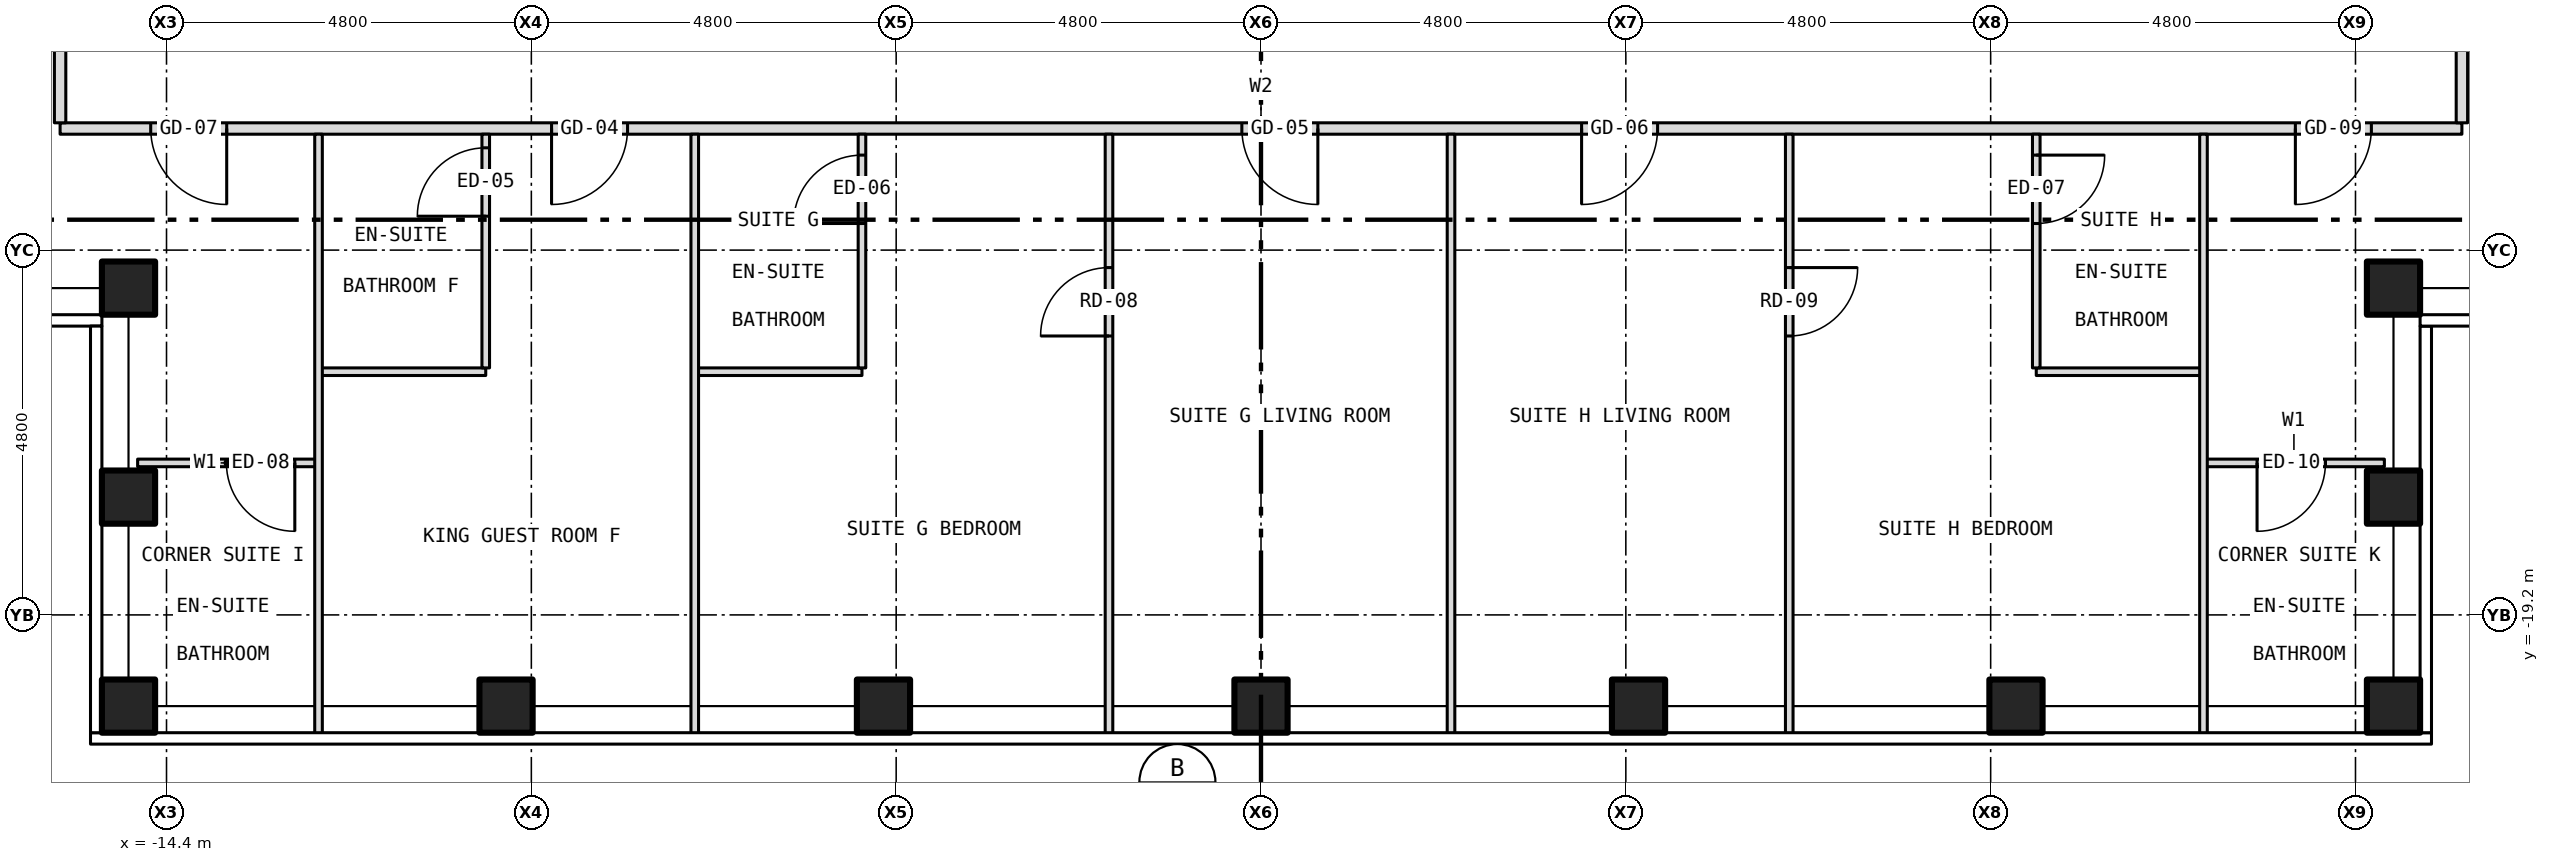
"""IFC4 building model, lengths in metres.
Left out: names, types, materials, properties, quantities, classifications, styles, units other than length and angle.
Written with IfcOpenShell. Run it as: python <this file> out.ifc"""

import sys

from ifc_helpers import new_model, si_unit, direction, frame, frame_2d, origin, origin_2d, place, context, subcontext, project, spatial, rectangle, hollow_rectangle, extrude, element, fill, save


model = new_model("IFC4")
c1 = context("Model", 3, precision=1e-05, world=origin(), true_north=direction((0.0, 1.0)))
c2 = subcontext(c1, "Body", "Model", "MODEL_VIEW")
j1 = project(units=[si_unit("LENGTHUNIT", "METRE"), si_unit("PLANEANGLEUNIT", "RADIAN")], contexts=[c1])
p1 = place(None, origin())
s1 = spatial("IfcSite", under=j1, at=p1, CompositionType="ELEMENT")
p2 = place(p1, origin())
s2 = spatial("IfcBuilding", under=s1, at=p2, CompositionType="ELEMENT")
p3 = place(p2, frame((0.0, 0.0, 212.0)))
s3 = spatial("IfcBuildingStorey", under=s2, at=p3, CompositionType="ELEMENT", Elevation=212.0)
for number, where, z_axis, x_axis in (
    (1, (-14.9, -20.4, -0.15), (0.0, 0.0, 1.0), (1.0, 0.0, 0.0)),
    (2, (-9.933, -20.4, -0.15), (0.0, 0.0, 1.0), (1.0, 0.0, 0.0)),
    (3, (-4.967, -20.4, -0.15), (0.0, 0.0, 1.0), (1.0, 0.0, 0.0)),
    (4, (0.0, -20.4, -0.15), (0.0, 0.0, 1.0), (1.0, 0.0, 0.0)),
    (5, (4.967, -20.4, -0.15), (0.0, 0.0, 1.0), (1.0, 0.0, 0.0)),
    (6, (9.933, -20.4, -0.15), (0.0, 0.0, 1.0), (1.0, 0.0, 0.0)),
    (7, (14.9, -20.4, -0.15), (0.0, 0.0, 1.0), (1.0, 0.0, 0.0)),
    (8, (-14.9, -14.9, -0.15), (0.0, 0.0, 1.0), (1.0, 0.0, 0.0)),
    (9, (-14.9, -17.65, -0.15), (0.0, 0.0, 1.0), (1.0, 0.0, 0.0)),
    (10, (14.9, -14.9, -0.15), (0.0, 0.0, 1.0), (1.0, 0.0, 0.0)),
    (11, (14.9, -17.65, -0.15), (0.0, 0.0, 1.0), (1.0, 0.0, 0.0)),
):
    element("IfcColumn", number, at=place(p3, frame(where, z_axis=z_axis, x_axis=x_axis)), inside=s3, PredefinedType="COLUMN", context=c2, shape_type="SweptSolid", body=[
        extrude(hollow_rectangle(XDim=0.7, YDim=0.7, WallThickness=0.04, at=origin_2d()), origin(), (0.0, 0.0, 1.0), 3.5),
    ])
p4 = place(p3, frame((-14.78, -17.2, 0.0), z_axis=(0.0, 0.0, 1.0), x_axis=(1.0, 0.0, 0.0)))
e12 = element("IfcWall", 12, at=p4, inside=s3, PredefinedType="PARTITIONING", context=c2, shape_type="SweptSolid", body=[
    extrude(rectangle(XDim=2.38, YDim=0.1, at=frame_2d((1.19, 0.0))), origin(), (0.0, 0.0, 1.0), 3.35),
])
p5 = place(p4, frame((1.168, 0.0, 0.0)))
e13 = element("IfcOpeningElement", 13, at=p5, cuts=e12, PredefinedType="OPENING", context=c2, shape_type="SweptSolid", body=[
    extrude(rectangle(XDim=0.9, YDim=2.1, at=frame_2d((0.45, 1.05))), frame((0.0, 0.062, 0.0), z_axis=(0.0, -1.0, 0.0), x_axis=(1.0, 0.0, 0.0)), (0.0, 0.0, 1.0), 0.124),
])
p6 = place(p3, frame((12.4, -17.2, 0.0), z_axis=(0.0, 0.0, 1.0), x_axis=(1.0, 0.0, 0.0)))
e14 = element("IfcWall", 14, at=p6, inside=s3, PredefinedType="PARTITIONING", context=c2, shape_type="SweptSolid", body=[
    extrude(rectangle(XDim=2.38, YDim=0.1, at=frame_2d((1.19, 0.0))), origin(), (0.0, 0.0, 1.0), 3.35),
])
p7 = place(p6, frame((0.705, 0.0, 0.0)))
e15 = element("IfcOpeningElement", 15, at=p7, cuts=e14, PredefinedType="OPENING", context=c2, shape_type="SweptSolid", body=[
    extrude(rectangle(XDim=0.9, YDim=2.1, at=frame_2d((0.45, 1.05))), frame((0.0, 0.062, 0.0), z_axis=(0.0, -1.0, 0.0), x_axis=(1.0, 0.0, 0.0)), (0.0, 0.0, 1.0), 0.124),
])
for number, where, z_axis, x_axis in (
    (16, (-12.4, -16.0, 0.0), (0.0, 0.0, 1.0), (1.0, 0.0, 0.0)),
    (17, (-7.45, -16.0, 0.0), (0.0, 0.0, 1.0), (1.0, 0.0, 0.0)),
    (18, (10.2, -16.0, 0.0), (0.0, 0.0, 1.0), (1.0, 0.0, 0.0)),
):
    element("IfcWall", number, at=place(p3, frame(where, z_axis=z_axis, x_axis=x_axis)), inside=s3, PredefinedType="PARTITIONING", context=c2, shape_type="SweptSolid", body=[
        extrude(rectangle(XDim=2.2, YDim=0.1, at=frame_2d((1.1, 0.0))), origin(), (0.0, 0.0, 1.0), 3.35),
    ])
p8 = place(p3, frame((-15.8, -12.8, 0.0), z_axis=(0.0, 0.0, 1.0), x_axis=(1.0, 0.0, 0.0)))
e19 = element("IfcWall", 19, at=p8, inside=s3, PredefinedType="PARTITIONING", context=c2, shape_type="SweptSolid", body=[
    extrude(rectangle(XDim=31.6, YDim=0.15, at=frame_2d((15.8, 0.0))), origin(), (0.0, 0.0, 1.0), 3.35),
])
p9 = place(p8, frame((6.466, 0.0, 0.0)))
e20 = element("IfcOpeningElement", 20, at=p9, cuts=e19, PredefinedType="OPENING", context=c2, shape_type="SweptSolid", body=[
    extrude(rectangle(XDim=1.0, YDim=2.1, at=frame_2d((0.5, 1.05))), frame((0.0, 0.087, 0.0), z_axis=(0.0, -1.0, 0.0), x_axis=(1.0, 0.0, 0.0)), (0.0, 0.0, 1.0), 0.174),
])
p10 = place(p8, frame((15.548, 0.0, 0.0)))
e21 = element("IfcOpeningElement", 21, at=p10, cuts=e19, PredefinedType="OPENING", context=c2, shape_type="SweptSolid", body=[
    extrude(rectangle(XDim=1.0, YDim=2.1, at=frame_2d((0.5, 1.05))), frame((0.0, 0.087, 0.0), z_axis=(0.0, -1.0, 0.0), x_axis=(1.0, 0.0, 0.0)), (0.0, 0.0, 1.0), 0.174),
])
p11 = place(p8, frame((20.018, 0.0, 0.0)))
e22 = element("IfcOpeningElement", 22, at=p11, cuts=e19, PredefinedType="OPENING", context=c2, shape_type="SweptSolid", body=[
    extrude(rectangle(XDim=1.0, YDim=2.1, at=frame_2d((0.5, 1.05))), frame((0.0, 0.087, 0.0), z_axis=(0.0, -1.0, 0.0), x_axis=(1.0, 0.0, 0.0)), (0.0, 0.0, 1.0), 0.174),
])
p12 = place(p8, frame((1.192, 0.0, 0.0)))
e23 = element("IfcOpeningElement", 23, at=p12, cuts=e19, PredefinedType="OPENING", context=c2, shape_type="SweptSolid", body=[
    extrude(rectangle(XDim=1.0, YDim=2.1, at=frame_2d((0.5, 1.05))), frame((0.0, 0.087, 0.0), z_axis=(0.0, -1.0, 0.0), x_axis=(1.0, 0.0, 0.0)), (0.0, 0.0, 1.0), 0.174),
])
p13 = place(p8, frame((29.409, 0.0, 0.0)))
e24 = element("IfcOpeningElement", 24, at=p13, cuts=e19, PredefinedType="OPENING", context=c2, shape_type="SweptSolid", body=[
    extrude(rectangle(XDim=1.0, YDim=2.1, at=frame_2d((0.5, 1.05))), frame((0.0, 0.087, 0.0), z_axis=(0.0, -1.0, 0.0), x_axis=(1.0, 0.0, 0.0)), (0.0, 0.0, 1.0), 0.174),
])
p14 = place(p3, frame((-15.8, -12.725, 0.0), z_axis=(0.0, 0.0, 1.0), x_axis=(0.0, 1.0, 0.0)))
e25 = element("IfcWall", 25, at=p14, inside=s3, PredefinedType="PARTITIONING", context=c2, shape_type="SweptSolid", body=[
    extrude(rectangle(XDim=1.805, YDim=0.15, at=frame_2d((0.903, 0.0))), origin(), (0.0, 0.0, 1.0), 3.35),
])
p15 = place(p3, frame((-12.4, -20.78, 0.0), z_axis=(0.0, 0.0, 1.0), x_axis=(0.0, 1.0, 0.0)))
e26 = element("IfcWall", 26, at=p15, inside=s3, PredefinedType="PARTITIONING", context=c2, shape_type="SweptSolid", body=[
    extrude(rectangle(XDim=7.905, YDim=0.1, at=frame_2d((3.953, 0.0))), origin(), (0.0, 0.0, 1.0), 3.35),
])
p16 = place(p3, frame((-10.2, -15.95, 0.0), z_axis=(0.0, 0.0, 1.0), x_axis=(0.0, 1.0, 0.0)))
e27 = element("IfcWall", 27, at=p16, inside=s3, PredefinedType="PARTITIONING", context=c2, shape_type="SweptSolid", body=[
    extrude(rectangle(XDim=3.075, YDim=0.1, at=frame_2d((1.538, 0.0))), origin(), (0.0, 0.0, 1.0), 3.35),
])
p17 = place(p16, frame((1.996, 0.0, 0.0)))
e28 = element("IfcOpeningElement", 28, at=p17, cuts=e27, PredefinedType="OPENING", context=c2, shape_type="SweptSolid", body=[
    extrude(rectangle(XDim=0.9, YDim=2.1, at=frame_2d((0.45, 1.05))), frame((0.0, 0.062, 0.0), z_axis=(0.0, -1.0, 0.0), x_axis=(1.0, 0.0, 0.0)), (0.0, 0.0, 1.0), 0.124),
])
p18 = place(p3, frame((-7.45, -20.78, 0.0), z_axis=(0.0, 0.0, 1.0), x_axis=(0.0, 1.0, 0.0)))
e29 = element("IfcWall", 29, at=p18, inside=s3, PredefinedType="PARTITIONING", context=c2, shape_type="SweptSolid", body=[
    extrude(rectangle(XDim=7.905, YDim=0.1, at=frame_2d((3.953, 0.0))), origin(), (0.0, 0.0, 1.0), 3.35),
])
p19 = place(p3, frame((-5.25, -15.95, 0.0), z_axis=(0.0, 0.0, 1.0), x_axis=(0.0, 1.0, 0.0)))
e30 = element("IfcWall", 30, at=p19, inside=s3, PredefinedType="PARTITIONING", context=c2, shape_type="SweptSolid", body=[
    extrude(rectangle(XDim=3.075, YDim=0.1, at=frame_2d((1.538, 0.0))), origin(), (0.0, 0.0, 1.0), 3.35),
])
p20 = place(p19, frame((1.9, 0.0, 0.0)))
e31 = element("IfcOpeningElement", 31, at=p20, cuts=e30, PredefinedType="OPENING", context=c2, shape_type="SweptSolid", body=[
    extrude(rectangle(XDim=0.9, YDim=2.1, at=frame_2d((0.45, 1.05))), frame((0.0, 0.062, 0.0), z_axis=(0.0, -1.0, 0.0), x_axis=(1.0, 0.0, 0.0)), (0.0, 0.0, 1.0), 0.124),
])
p21 = place(p3, frame((-2.0, -20.78, 0.0), z_axis=(0.0, 0.0, 1.0), x_axis=(0.0, 1.0, 0.0)))
e32 = element("IfcWall", 32, at=p21, inside=s3, PredefinedType="PARTITIONING", context=c2, shape_type="SweptSolid", body=[
    extrude(rectangle(XDim=7.905, YDim=0.1, at=frame_2d((3.953, 0.0))), origin(), (0.0, 0.0, 1.0), 3.35),
])
p22 = place(p21, frame((5.25, 0.0, 0.0)))
e33 = element("IfcOpeningElement", 33, at=p22, cuts=e32, PredefinedType="OPENING", context=c2, shape_type="SweptSolid", body=[
    extrude(rectangle(XDim=0.9, YDim=2.1, at=frame_2d((0.45, 1.05))), frame((0.0, 0.062, 0.0), z_axis=(0.0, -1.0, 0.0), x_axis=(1.0, 0.0, 0.0)), (0.0, 0.0, 1.0), 0.124),
])
p23 = place(p3, frame((2.5, -20.78, 0.0), z_axis=(0.0, 0.0, 1.0), x_axis=(0.0, 1.0, 0.0)))
e34 = element("IfcWall", 34, at=p23, inside=s3, PredefinedType="PARTITIONING", context=c2, shape_type="SweptSolid", body=[
    extrude(rectangle(XDim=7.905, YDim=0.1, at=frame_2d((3.953, 0.0))), origin(), (0.0, 0.0, 1.0), 3.35),
])
p24 = place(p3, frame((6.95, -20.78, 0.0), z_axis=(0.0, 0.0, 1.0), x_axis=(0.0, 1.0, 0.0)))
e35 = element("IfcWall", 35, at=p24, inside=s3, PredefinedType="PARTITIONING", context=c2, shape_type="SweptSolid", body=[
    extrude(rectangle(XDim=7.905, YDim=0.1, at=frame_2d((3.953, 0.0))), origin(), (0.0, 0.0, 1.0), 3.35),
])
p25 = place(p24, frame((5.25, 0.0, 0.0)))
e36 = element("IfcOpeningElement", 36, at=p25, cuts=e35, PredefinedType="OPENING", context=c2, shape_type="SweptSolid", body=[
    extrude(rectangle(XDim=0.9, YDim=2.1, at=frame_2d((0.45, 1.05))), frame((0.0, 0.062, 0.0), z_axis=(0.0, -1.0, 0.0), x_axis=(1.0, 0.0, 0.0)), (0.0, 0.0, 1.0), 0.124),
])
p26 = place(p3, frame((10.2, -15.95, 0.0), z_axis=(0.0, 0.0, 1.0), x_axis=(0.0, 1.0, 0.0)))
e37 = element("IfcWall", 37, at=p26, inside=s3, PredefinedType="PARTITIONING", context=c2, shape_type="SweptSolid", body=[
    extrude(rectangle(XDim=3.075, YDim=0.1, at=frame_2d((1.538, 0.0))), origin(), (0.0, 0.0, 1.0), 3.35),
])
p27 = place(p26, frame((1.9, 0.0, 0.0)))
e38 = element("IfcOpeningElement", 38, at=p27, cuts=e37, PredefinedType="OPENING", context=c2, shape_type="SweptSolid", body=[
    extrude(rectangle(XDim=0.9, YDim=2.1, at=frame_2d((0.45, 1.05))), frame((0.0, 0.062, 0.0), z_axis=(0.0, -1.0, 0.0), x_axis=(1.0, 0.0, 0.0)), (0.0, 0.0, 1.0), 0.124),
])
p28 = place(p3, frame((12.4, -20.78, 0.0), z_axis=(0.0, 0.0, 1.0), x_axis=(0.0, 1.0, 0.0)))
e39 = element("IfcWall", 39, at=p28, inside=s3, PredefinedType="PARTITIONING", context=c2, shape_type="SweptSolid", body=[
    extrude(rectangle(XDim=7.905, YDim=0.1, at=frame_2d((3.953, 0.0))), origin(), (0.0, 0.0, 1.0), 3.35),
])
p29 = place(p3, frame((15.8, -12.725, 0.0), z_axis=(0.0, 0.0, 1.0), x_axis=(0.0, 1.0, 0.0)))
e40 = element("IfcWall", 40, at=p29, inside=s3, PredefinedType="PARTITIONING", context=c2, shape_type="SweptSolid", body=[
    extrude(rectangle(XDim=1.805, YDim=0.15, at=frame_2d((0.903, 0.0))), origin(), (0.0, 0.0, 1.0), 3.35),
])
p30 = place(p9, origin())
e41 = element("IfcDoor", 41, at=p30, inside=s3, OperationType="SINGLE_SWING_LEFT", PredefinedType="DOOR", context=c2, shape_type="SweptSolid", body=[
    extrude(rectangle(XDim=1.0, YDim=2.1, at=frame_2d((0.5, 1.05))), frame((0.0, 0.025, 0.0), z_axis=(0.0, -1.0, 0.0), x_axis=(1.0, 0.0, 0.0)), (0.0, 0.0, 1.0), 0.05),
])
fill(e20, e41)
p31 = place(p17, origin())
e42 = element("IfcDoor", 42, at=p31, inside=s3, OperationType="SINGLE_SWING_LEFT", PredefinedType="DOOR", context=c2, shape_type="SweptSolid", body=[
    extrude(rectangle(XDim=0.9, YDim=2.1, at=frame_2d((0.45, 1.05))), frame((0.0, 0.025, 0.0), z_axis=(0.0, -1.0, 0.0), x_axis=(1.0, 0.0, 0.0)), (0.0, 0.0, 1.0), 0.05),
])
fill(e28, e42)
p32 = place(p10, origin())
e43 = element("IfcDoor", 43, at=p32, inside=s3, OperationType="SINGLE_SWING_RIGHT", PredefinedType="DOOR", context=c2, shape_type="SweptSolid", body=[
    extrude(rectangle(XDim=1.0, YDim=2.1, at=frame_2d((0.5, 1.05))), frame((0.0, 0.025, 0.0), z_axis=(0.0, -1.0, 0.0), x_axis=(1.0, 0.0, 0.0)), (0.0, 0.0, 1.0), 0.05),
])
fill(e21, e43)
p33 = place(p22, origin())
e44 = element("IfcDoor", 44, at=p33, inside=s3, OperationType="SINGLE_SWING_LEFT", PredefinedType="DOOR", context=c2, shape_type="SweptSolid", body=[
    extrude(rectangle(XDim=0.9, YDim=2.1, at=frame_2d((0.45, 1.05))), frame((0.0, 0.025, 0.0), z_axis=(0.0, -1.0, 0.0), x_axis=(1.0, 0.0, 0.0)), (0.0, 0.0, 1.0), 0.05),
])
fill(e33, e44)
p34 = place(p20, origin())
e45 = element("IfcDoor", 45, at=p34, inside=s3, OperationType="SINGLE_SWING_LEFT", PredefinedType="DOOR", context=c2, shape_type="SweptSolid", body=[
    extrude(rectangle(XDim=0.9, YDim=2.1, at=frame_2d((0.45, 1.05))), frame((0.0, 0.025, 0.0), z_axis=(0.0, -1.0, 0.0), x_axis=(1.0, 0.0, 0.0)), (0.0, 0.0, 1.0), 0.05),
])
fill(e31, e45)
p35 = place(p11, origin())
e46 = element("IfcDoor", 46, at=p35, inside=s3, OperationType="SINGLE_SWING_LEFT", PredefinedType="DOOR", context=c2, shape_type="SweptSolid", body=[
    extrude(rectangle(XDim=1.0, YDim=2.1, at=frame_2d((0.5, 1.05))), frame((0.0, 0.025, 0.0), z_axis=(0.0, -1.0, 0.0), x_axis=(1.0, 0.0, 0.0)), (0.0, 0.0, 1.0), 0.05),
])
fill(e22, e46)
p36 = place(p25, origin())
e47 = element("IfcDoor", 47, at=p36, inside=s3, OperationType="SINGLE_SWING_RIGHT", PredefinedType="DOOR", context=c2, shape_type="SweptSolid", body=[
    extrude(rectangle(XDim=0.9, YDim=2.1, at=frame_2d((0.45, 1.05))), frame((0.0, 0.025, 0.0), z_axis=(0.0, -1.0, 0.0), x_axis=(1.0, 0.0, 0.0)), (0.0, 0.0, 1.0), 0.05),
])
fill(e36, e47)
p37 = place(p27, origin())
e48 = element("IfcDoor", 48, at=p37, inside=s3, OperationType="SINGLE_SWING_RIGHT", PredefinedType="DOOR", context=c2, shape_type="SweptSolid", body=[
    extrude(rectangle(XDim=0.9, YDim=2.1, at=frame_2d((0.45, 1.05))), frame((0.0, 0.025, 0.0), z_axis=(0.0, -1.0, 0.0), x_axis=(1.0, 0.0, 0.0)), (0.0, 0.0, 1.0), 0.05),
])
fill(e38, e48)
p38 = place(p5, origin())
e49 = element("IfcDoor", 49, at=p38, inside=s3, OperationType="SINGLE_SWING_RIGHT", PredefinedType="DOOR", context=c2, shape_type="SweptSolid", body=[
    extrude(rectangle(XDim=0.9, YDim=2.1, at=frame_2d((0.45, 1.05))), frame((0.0, 0.025, 0.0), z_axis=(0.0, -1.0, 0.0), x_axis=(1.0, 0.0, 0.0)), (0.0, 0.0, 1.0), 0.05),
])
fill(e13, e49)
p39 = place(p12, origin())
e50 = element("IfcDoor", 50, at=p39, inside=s3, OperationType="SINGLE_SWING_RIGHT", PredefinedType="DOOR", context=c2, shape_type="SweptSolid", body=[
    extrude(rectangle(XDim=1.0, YDim=2.1, at=frame_2d((0.5, 1.05))), frame((0.0, 0.025, 0.0), z_axis=(0.0, -1.0, 0.0), x_axis=(1.0, 0.0, 0.0)), (0.0, 0.0, 1.0), 0.05),
])
fill(e23, e50)
p40 = place(p7, origin())
e51 = element("IfcDoor", 51, at=p40, inside=s3, OperationType="SINGLE_SWING_LEFT", PredefinedType="DOOR", context=c2, shape_type="SweptSolid", body=[
    extrude(rectangle(XDim=0.9, YDim=2.1, at=frame_2d((0.45, 1.05))), frame((0.0, 0.025, 0.0), z_axis=(0.0, -1.0, 0.0), x_axis=(1.0, 0.0, 0.0)), (0.0, 0.0, 1.0), 0.05),
])
fill(e15, e51)
p41 = place(p13, origin())
e52 = element("IfcDoor", 52, at=p41, inside=s3, OperationType="SINGLE_SWING_LEFT", PredefinedType="DOOR", context=c2, shape_type="SweptSolid", body=[
    extrude(rectangle(XDim=1.0, YDim=2.1, at=frame_2d((0.5, 1.05))), frame((0.0, 0.025, 0.0), z_axis=(0.0, -1.0, 0.0), x_axis=(1.0, 0.0, 0.0)), (0.0, 0.0, 1.0), 0.05),
])
fill(e24, e52)
save(model, sys.argv[1])
